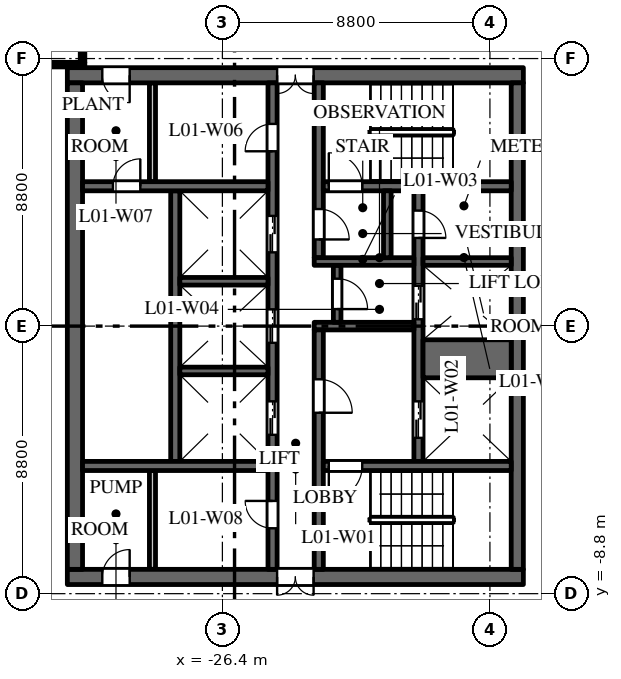
"""IFC4 building model, lengths in metres.
Left out: names, types, materials, properties, quantities, classifications, styles, units other than length and angle.
Written with IfcOpenShell. Run it as: python <this file> out.ifc"""

import sys

from ifc_helpers import new_model, si_unit, direction, frame, frame_2d, origin, place, context, subcontext, project, spatial, rectangle, extrude, element, fill, save


model = new_model("IFC4")
c1 = context("Model", 3, precision=1e-05, world=origin(), true_north=direction((0.0, 1.0)))
c2 = subcontext(c1, "Body", "Model", "MODEL_VIEW")
j1 = project(units=[si_unit("LENGTHUNIT", "METRE"), si_unit("PLANEANGLEUNIT", "RADIAN")], contexts=[c1])
p1 = place(None, origin())
s1 = spatial("IfcSite", under=j1, at=p1, CompositionType="ELEMENT")
p2 = place(p1, origin())
s2 = spatial("IfcBuilding", under=s1, at=p2, CompositionType="ELEMENT")
p3 = place(p2, frame((0.0, 0.0, 7.5)))
s3 = spatial("IfcBuildingStorey", under=s2, at=p3, CompositionType="ELEMENT", Elevation=7.5)
p4 = place(p3, frame((-16.5, 8.25, 0.0), z_axis=(0.0, 0.0, 1.0), x_axis=(-1.0, 0.0, 0.0)))
e1 = element("IfcWall", 1, at=p4, inside=s3, PredefinedType="SHEAR", context=c2, shape_type="SweptSolid", body=[
    extrude(rectangle(XDim=15.0, YDim=0.5, at=frame_2d((7.5, 0.0))), origin(), (0.0, 0.0, 1.0), 5.75),
])
p5 = place(p4, frame((6.9, 0.0, 0.0)))
e2 = element("IfcOpeningElement", 2, at=p5, cuts=e1, PredefinedType="OPENING", context=c2, shape_type="SweptSolid", body=[
    extrude(rectangle(XDim=1.2, YDim=2.1, at=frame_2d((0.6, 1.05))), frame((0.0, 0.26, 0.0), z_axis=(0.0, -1.0, 0.0), x_axis=(1.0, 0.0, 0.0)), (0.0, 0.0, 1.0), 0.52),
])
p6 = place(p4, frame((12.95, 0.0, 0.0)))
e3 = element("IfcOpeningElement", 3, at=p6, cuts=e1, PredefinedType="OPENING", context=c2, shape_type="SweptSolid", body=[
    extrude(rectangle(XDim=0.9, YDim=2.1, at=frame_2d((0.45, 1.05))), frame((0.0, 0.26, 0.0), z_axis=(0.0, -1.0, 0.0), x_axis=(1.0, 0.0, 0.0)), (0.0, 0.0, 1.0), 0.52),
])
p7 = place(p3, frame((-16.5, -8.25, 0.0), z_axis=(0.0, 0.0, 1.0), x_axis=(-1.0, 0.0, 0.0)))
e4 = element("IfcWall", 4, at=p7, inside=s3, PredefinedType="SHEAR", context=c2, shape_type="SweptSolid", body=[
    extrude(rectangle(XDim=15.0, YDim=0.5, at=frame_2d((7.5, 0.0))), origin(), (0.0, 0.0, 1.0), 5.75),
])
p8 = place(p7, frame((6.9, 0.0, 0.0)))
e5 = element("IfcOpeningElement", 5, at=p8, cuts=e4, PredefinedType="OPENING", context=c2, shape_type="SweptSolid", body=[
    extrude(rectangle(XDim=1.2, YDim=2.1, at=frame_2d((0.6, 1.05))), frame((0.0, 0.26, 0.0), z_axis=(0.0, -1.0, 0.0), x_axis=(1.0, 0.0, 0.0)), (0.0, 0.0, 1.0), 0.52),
])
p9 = place(p7, frame((12.95, 0.0, 0.0)))
e6 = element("IfcOpeningElement", 6, at=p9, cuts=e4, PredefinedType="OPENING", context=c2, shape_type="SweptSolid", body=[
    extrude(rectangle(XDim=0.9, YDim=2.1, at=frame_2d((0.45, 1.05))), frame((0.0, 0.26, 0.0), z_axis=(0.0, -1.0, 0.0), x_axis=(1.0, 0.0, 0.0)), (0.0, 0.0, 1.0), 0.52),
])
p10 = place(p3, frame((-27.95, -4.45, 0.0), z_axis=(0.0, 0.0, 1.0), x_axis=(0.0, 1.0, 0.0)))
e7 = element("IfcWall", 7, at=p10, inside=s3, PredefinedType="SHEAR", context=c2, shape_type="SweptSolid", body=[
    extrude(rectangle(XDim=8.9, YDim=0.3, at=frame_2d((4.45, 0.0))), origin(), (0.0, 0.0, 1.0), 5.75),
])
p11 = place(p3, frame((-19.95, -4.45, 0.0), z_axis=(0.0, 0.0, 1.0), x_axis=(0.0, 1.0, 0.0)))
e8 = element("IfcWall", 8, at=p11, inside=s3, PredefinedType="SHEAR", context=c2, shape_type="SweptSolid", body=[
    extrude(rectangle(XDim=8.9, YDim=0.3, at=frame_2d((4.45, 0.0))), origin(), (0.0, 0.0, 1.0), 5.75),
])
p12 = place(p11, frame((0.775, 0.0, 0.0)))
e9 = element("IfcOpeningElement", 9, at=p12, cuts=e8, PredefinedType="OPENING", context=c2, shape_type="SweptSolid", body=[
    extrude(rectangle(XDim=1.2, YDim=2.1, at=frame_2d((0.6, 1.05))), frame((0.0, 0.16, 0.0), z_axis=(0.0, -1.0, 0.0), x_axis=(1.0, 0.0, 0.0)), (0.0, 0.0, 1.0), 0.32),
])
p13 = place(p11, frame((4.675, 0.0, 0.0)))
e10 = element("IfcOpeningElement", 10, at=p13, cuts=e8, PredefinedType="OPENING", context=c2, shape_type="SweptSolid", body=[
    extrude(rectangle(XDim=1.1, YDim=2.1, at=frame_2d((0.55, 1.05))), frame((0.0, 0.16, 0.0), z_axis=(0.0, -1.0, 0.0), x_axis=(1.0, 0.0, 0.0)), (0.0, 0.0, 1.0), 0.32),
])
p14 = place(p11, frame((7.35, 0.0, 0.0)))
e11 = element("IfcOpeningElement", 11, at=p14, cuts=e8, PredefinedType="OPENING", context=c2, shape_type="SweptSolid", body=[
    extrude(rectangle(XDim=0.9, YDim=2.1, at=frame_2d((0.45, 1.05))), frame((0.0, 0.16, 0.0), z_axis=(0.0, -1.0, 0.0), x_axis=(1.0, 0.0, 0.0)), (0.0, 0.0, 1.0), 0.32),
])
p15 = place(p3, frame((-24.75, -8.0, 0.0), z_axis=(0.0, 0.0, 1.0), x_axis=(0.0, 1.0, 0.0)))
e12 = element("IfcWall", 12, at=p15, inside=s3, PredefinedType="SHEAR", context=c2, shape_type="SweptSolid", body=[
    extrude(rectangle(XDim=16.0, YDim=0.3, at=frame_2d((8.0, 0.0))), origin(), (0.0, 0.0, 1.0), 5.75),
])
p16 = place(p15, frame((4.425, 0.0, 0.0)))
e13 = element("IfcOpeningElement", 13, at=p16, cuts=e12, PredefinedType="OPENING", context=c2, shape_type="SweptSolid", body=[
    extrude(rectangle(XDim=1.1, YDim=2.1, at=frame_2d((0.55, 1.05))), frame((0.0, 0.16, 0.0), z_axis=(0.0, -1.0, 0.0), x_axis=(1.0, 0.0, 0.0)), (0.0, 0.0, 1.0), 0.32),
])
p17 = place(p15, frame((7.45, 0.0, 0.0)))
e14 = element("IfcOpeningElement", 14, at=p17, cuts=e12, PredefinedType="OPENING", context=c2, shape_type="SweptSolid", body=[
    extrude(rectangle(XDim=1.1, YDim=2.1, at=frame_2d((0.55, 1.05))), frame((0.0, 0.16, 0.0), z_axis=(0.0, -1.0, 0.0), x_axis=(1.0, 0.0, 0.0)), (0.0, 0.0, 1.0), 0.32),
])
p18 = place(p15, frame((10.425, 0.0, 0.0)))
e15 = element("IfcOpeningElement", 15, at=p18, cuts=e12, PredefinedType="OPENING", context=c2, shape_type="SweptSolid", body=[
    extrude(rectangle(XDim=1.2, YDim=2.1, at=frame_2d((0.6, 1.05))), frame((0.0, 0.16, 0.0), z_axis=(0.0, -1.0, 0.0), x_axis=(1.0, 0.0, 0.0)), (0.0, 0.0, 1.0), 0.32),
])
p19 = place(p15, frame((13.75, 0.0, 0.0)))
e16 = element("IfcOpeningElement", 16, at=p19, cuts=e12, PredefinedType="OPENING", context=c2, shape_type="SweptSolid", body=[
    extrude(rectangle(XDim=0.9, YDim=2.1, at=frame_2d((0.45, 1.05))), frame((0.0, 0.16, 0.0), z_axis=(0.0, -1.0, 0.0), x_axis=(1.0, 0.0, 0.0)), (0.0, 0.0, 1.0), 0.32),
])
p20 = place(p15, frame((1.35, 0.0, 0.0)))
e17 = element("IfcOpeningElement", 17, at=p20, cuts=e12, PredefinedType="OPENING", context=c2, shape_type="SweptSolid", body=[
    extrude(rectangle(XDim=0.9, YDim=2.1, at=frame_2d((0.45, 1.05))), frame((0.0, 0.16, 0.0), z_axis=(0.0, -1.0, 0.0), x_axis=(1.0, 0.0, 0.0)), (0.0, 0.0, 1.0), 0.32),
])
p21 = place(p3, frame((-20.1, 0.0, 0.0), z_axis=(0.0, 0.0, 1.0), x_axis=(-1.0, 0.0, 0.0)))
e18 = element("IfcWall", 18, at=p21, inside=s3, PredefinedType="SHEAR", context=c2, shape_type="SweptSolid", body=[
    extrude(rectangle(XDim=3.28, YDim=0.25, at=frame_2d((1.64, 0.0))), origin(), (0.0, 0.0, 1.0), 5.75),
])
p22 = place(p3, frame((-16.7, -8.0, 0.0), z_axis=(0.0, 0.0, 1.0), x_axis=(0.0, 1.0, 0.0)))
e19 = element("IfcWall", 19, at=p22, inside=s3, PredefinedType="SHEAR", context=c2, shape_type="SweptSolid", body=[
    extrude(rectangle(XDim=16.0, YDim=0.4, at=frame_2d((8.0, 0.0))), origin(), (0.0, 0.0, 1.0), 5.75),
])
p23 = place(p3, frame((-22.625, 0.125, 0.0), z_axis=(0.0, 0.0, 1.0), x_axis=(0.0, 1.0, 0.0)))
e20 = element("IfcWall", 20, at=p23, inside=s3, PredefinedType="SHEAR", context=c2, shape_type="SweptSolid", body=[
    extrude(rectangle(XDim=1.875, YDim=0.25, at=frame_2d((0.938, 0.0))), origin(), (0.0, 0.0, 1.0), 5.75),
])
p24 = place(p23, frame((0.435, 0.0, 0.0)))
e21 = element("IfcOpeningElement", 21, at=p24, cuts=e20, PredefinedType="OPENING", context=c2, shape_type="SweptSolid", body=[
    extrude(rectangle(XDim=1.0, YDim=2.1, at=frame_2d((0.5, 1.05))), frame((0.0, 0.135, 0.0), z_axis=(0.0, -1.0, 0.0), x_axis=(1.0, 0.0, 0.0)), (0.0, 0.0, 1.0), 0.27),
])
p25 = place(p3, frame((-31.25, -8.0, 0.0), z_axis=(0.0, 0.0, 1.0), x_axis=(0.0, 1.0, 0.0)))
e22 = element("IfcWall", 22, at=p25, inside=s3, PredefinedType="SHEAR", context=c2, shape_type="SweptSolid", body=[
    extrude(rectangle(XDim=16.0, YDim=0.5, at=frame_2d((8.0, 0.0))), origin(), (0.0, 0.0, 1.0), 5.75),
])
p26 = place(p3, frame((-24.9, 4.6, 0.0), z_axis=(0.0, 0.0, 1.0), x_axis=(-1.0, 0.0, 0.0)))
e23 = element("IfcWall", 23, at=p26, inside=s3, PredefinedType="SHEAR", context=c2, shape_type="SweptSolid", body=[
    extrude(rectangle(XDim=6.1, YDim=0.3, at=frame_2d((3.05, 0.0))), origin(), (0.0, 0.0, 1.0), 5.75),
])
p27 = place(p26, frame((4.2, 0.0, 0.0)))
e24 = element("IfcOpeningElement", 24, at=p27, cuts=e23, PredefinedType="OPENING", context=c2, shape_type="SweptSolid", body=[
    extrude(rectangle(XDim=0.9, YDim=2.1, at=frame_2d((0.45, 1.05))), frame((0.0, 0.16, 0.0), z_axis=(0.0, -1.0, 0.0), x_axis=(1.0, 0.0, 0.0)), (0.0, 0.0, 1.0), 0.32),
])
for number, where, z_axis, x_axis in (
    (25, (-28.7, 4.75, 0.0), (0.0, 0.0, 1.0), (0.0, 1.0, 0.0)),
    (26, (-28.7, -8.0, 0.0), (0.0, 0.0, 1.0), (0.0, 1.0, 0.0)),
):
    element("IfcWall", number, at=place(p3, frame(where, z_axis=z_axis, x_axis=x_axis)), inside=s3, PredefinedType="PARTITIONING", context=c2, shape_type="SweptSolid", body=[
        extrude(rectangle(XDim=3.25, YDim=0.2, at=frame_2d((1.625, 0.0))), origin(), (0.0, 0.0, 1.0), 5.75),
    ])
p28 = place(p3, frame((-24.9, -4.6, 0.0), z_axis=(0.0, 0.0, 1.0), x_axis=(-1.0, 0.0, 0.0)))
e27 = element("IfcWall", 27, at=p28, inside=s3, PredefinedType="SHEAR", context=c2, shape_type="SweptSolid", body=[
    extrude(rectangle(XDim=6.1, YDim=0.3, at=frame_2d((3.05, 0.0))), origin(), (0.0, 0.0, 1.0), 5.75),
])
p29 = place(p3, frame((-16.9, -1.075, 0.0), z_axis=(0.0, 0.0, 1.0), x_axis=(-1.0, 0.0, 0.0)))
e28 = element("IfcWall", 28, at=p29, inside=s3, PredefinedType="SHEAR", context=c2, shape_type="SweptSolid", body=[
    extrude(rectangle(XDim=2.9, YDim=1.25, at=frame_2d((1.45, 0.0))), origin(), (0.0, 0.0, 1.0), 5.75),
])
for number, where, z_axis, x_axis in (
    (29, (-16.9, 2.125, 0.0), (0.0, 0.0, 1.0), (-1.0, 0.0, 0.0)),
    (30, (-24.9, -1.475, 0.0), (0.0, 0.0, 1.0), (-1.0, 0.0, 0.0)),
    (31, (-24.9, 1.475, 0.0), (0.0, 0.0, 1.0), (-1.0, 0.0, 0.0)),
):
    element("IfcWall", number, at=place(p3, frame(where, z_axis=z_axis, x_axis=x_axis)), inside=s3, PredefinedType="SHEAR", context=c2, shape_type="SweptSolid", body=[
        extrude(rectangle(XDim=2.9, YDim=0.25, at=frame_2d((1.45, 0.0))), origin(), (0.0, 0.0, 1.0), 5.75),
    ])
p30 = place(p3, frame((-23.23, 2.25, 0.0), z_axis=(0.0, 0.0, 1.0), x_axis=(0.0, 1.0, 0.0)))
e32 = element("IfcWall", 32, at=p30, inside=s3, PredefinedType="SHEAR", context=c2, shape_type="SweptSolid", body=[
    extrude(rectangle(XDim=5.75, YDim=0.3, at=frame_2d((2.875, 0.0))), origin(), (0.0, 0.0, 1.0), 5.75),
])
p31 = place(p30, frame((0.6, 0.0, 0.0)))
e33 = element("IfcOpeningElement", 33, at=p31, cuts=e32, PredefinedType="OPENING", context=c2, shape_type="SweptSolid", body=[
    extrude(rectangle(XDim=1.0, YDim=2.1, at=frame_2d((0.5, 1.05))), frame((0.0, 0.16, 0.0), z_axis=(0.0, -1.0, 0.0), x_axis=(1.0, 0.0, 0.0)), (0.0, 0.0, 1.0), 0.32),
])
p32 = place(p3, frame((-23.23, -8.0, 0.0), z_axis=(0.0, 0.0, 1.0), x_axis=(0.0, 1.0, 0.0)))
e34 = element("IfcWall", 34, at=p32, inside=s3, PredefinedType="SHEAR", context=c2, shape_type="SweptSolid", body=[
    extrude(rectangle(XDim=7.875, YDim=0.3, at=frame_2d((3.938, 0.0))), origin(), (0.0, 0.0, 1.0), 5.75),
])
p33 = place(p32, frame((5.15, 0.0, 0.0)))
e35 = element("IfcOpeningElement", 35, at=p33, cuts=e34, PredefinedType="OPENING", context=c2, shape_type="SweptSolid", body=[
    extrude(rectangle(XDim=1.1, YDim=2.1, at=frame_2d((0.55, 1.05))), frame((0.0, 0.16, 0.0), z_axis=(0.0, -1.0, 0.0), x_axis=(1.0, 0.0, 0.0)), (0.0, 0.0, 1.0), 0.32),
])
p34 = place(p3, frame((-16.9, 4.6, 0.0), z_axis=(0.0, 0.0, 1.0), x_axis=(-1.0, 0.0, 0.0)))
e36 = element("IfcWall", 36, at=p34, inside=s3, PredefinedType="SHEAR", context=c2, shape_type="SweptSolid", body=[
    extrude(rectangle(XDim=6.18, YDim=0.3, at=frame_2d((3.09, 0.0))), origin(), (0.0, 0.0, 1.0), 5.75),
])
p35 = place(p34, frame((4.9, 0.0, 0.0)))
e37 = element("IfcOpeningElement", 37, at=p35, cuts=e36, PredefinedType="OPENING", context=c2, shape_type="SweptSolid", body=[
    extrude(rectangle(XDim=1.1, YDim=2.1, at=frame_2d((0.55, 1.05))), frame((0.0, 0.16, 0.0), z_axis=(0.0, -1.0, 0.0), x_axis=(1.0, 0.0, 0.0)), (0.0, 0.0, 1.0), 0.32),
])
p36 = place(p3, frame((-16.9, -4.6, 0.0), z_axis=(0.0, 0.0, 1.0), x_axis=(-1.0, 0.0, 0.0)))
e38 = element("IfcWall", 38, at=p36, inside=s3, PredefinedType="SHEAR", context=c2, shape_type="SweptSolid", body=[
    extrude(rectangle(XDim=6.18, YDim=0.3, at=frame_2d((3.09, 0.0))), origin(), (0.0, 0.0, 1.0), 5.75),
])
p37 = place(p36, frame((4.9, 0.0, 0.0)))
e39 = element("IfcOpeningElement", 39, at=p37, cuts=e38, PredefinedType="OPENING", context=c2, shape_type="SweptSolid", body=[
    extrude(rectangle(XDim=1.1, YDim=2.1, at=frame_2d((0.55, 1.05))), frame((0.0, 0.16, 0.0), z_axis=(0.0, -1.0, 0.0), x_axis=(1.0, 0.0, 0.0)), (0.0, 0.0, 1.0), 0.32),
])
p38 = place(p3, frame((-20.1, 2.125, 0.0), z_axis=(0.0, 0.0, 1.0), x_axis=(-1.0, 0.0, 0.0)))
e40 = element("IfcWall", 40, at=p38, inside=s3, PredefinedType="SHEAR", context=c2, shape_type="SweptSolid", body=[
    extrude(rectangle(XDim=3.28, YDim=0.25, at=frame_2d((1.64, 0.0))), origin(), (0.0, 0.0, 1.0), 5.75),
])
p39 = place(p3, frame((-20.975, 2.25, 0.0), z_axis=(0.0, 0.0, 1.0), x_axis=(0.0, 1.0, 0.0)))
e41 = element("IfcWall", 41, at=p39, inside=s3, PredefinedType="SHEAR", context=c2, shape_type="SweptSolid", body=[
    extrude(rectangle(XDim=2.2, YDim=0.25, at=frame_2d((1.1, 0.0))), origin(), (0.0, 0.0, 1.0), 5.75),
])
p40 = place(p3, frame((-30.925, 8.6, 0.0), z_axis=(0.0, 0.0, 1.0), x_axis=(-1.0, 0.0, 0.0)))
e42 = element("IfcWall", 42, at=p40, inside=s3, PredefinedType="PARTITIONING", context=c2, shape_type="SweptSolid", body=[
    extrude(rectangle(XDim=8.025, YDim=0.15, at=frame_2d((4.012, 0.0))), origin(), (0.0, 0.0, 1.0), 4.85),
])
p41 = place(p40, frame((4.012, 0.0, 0.0)))
e43 = element("IfcOpeningElement", 43, at=p41, cuts=e42, PredefinedType="OPENING", context=c2, shape_type="SweptSolid", body=[
    extrude(rectangle(XDim=1.0, YDim=2.1, at=frame_2d((0.5, 1.05))), frame((0.0, 0.085, 0.0), z_axis=(0.0, -1.0, 0.0), x_axis=(1.0, 0.0, 0.0)), (0.0, 0.0, 1.0), 0.17),
])
p42 = place(p3, frame((-31.0, 11.925, 0.0), z_axis=(0.0, 0.0, 1.0), x_axis=(0.0, -1.0, 0.0)))
e44 = element("IfcWall", 44, at=p42, inside=s3, PredefinedType="PARTITIONING", context=c2, shape_type="SweptSolid", body=[
    extrude(rectangle(XDim=3.25, YDim=0.15, at=frame_2d((1.625, 0.0))), origin(), (0.0, 0.0, 1.0), 5.75),
])
p43 = place(p12, origin())
e45 = element("IfcDoor", 45, at=p43, inside=s3, OperationType="DOUBLE_DOOR_SLIDING", PredefinedType="DOOR", context=c2, shape_type="SweptSolid", body=[
    extrude(rectangle(XDim=1.2, YDim=2.1, at=frame_2d((0.6, 1.05))), frame((0.0, 0.025, 0.0), z_axis=(0.0, -1.0, 0.0), x_axis=(1.0, 0.0, 0.0)), (0.0, 0.0, 1.0), 0.05),
])
fill(e9, e45)
p44 = place(p13, origin())
e46 = element("IfcDoor", 46, at=p44, inside=s3, OperationType="DOUBLE_DOOR_SLIDING", PredefinedType="DOOR", context=c2, shape_type="SweptSolid", body=[
    extrude(rectangle(XDim=1.1, YDim=2.1, at=frame_2d((0.55, 1.05))), frame((0.0, 0.025, 0.0), z_axis=(0.0, -1.0, 0.0), x_axis=(1.0, 0.0, 0.0)), (0.0, 0.0, 1.0), 0.05),
])
fill(e10, e46)
p45 = place(p16, origin())
e47 = element("IfcDoor", 47, at=p45, inside=s3, OperationType="DOUBLE_DOOR_SLIDING", PredefinedType="DOOR", context=c2, shape_type="SweptSolid", body=[
    extrude(rectangle(XDim=1.1, YDim=2.1, at=frame_2d((0.55, 1.05))), frame((0.0, 0.025, 0.0), z_axis=(0.0, -1.0, 0.0), x_axis=(1.0, 0.0, 0.0)), (0.0, 0.0, 1.0), 0.05),
])
fill(e13, e47)
p46 = place(p17, origin())
e48 = element("IfcDoor", 48, at=p46, inside=s3, OperationType="DOUBLE_DOOR_SLIDING", PredefinedType="DOOR", context=c2, shape_type="SweptSolid", body=[
    extrude(rectangle(XDim=1.1, YDim=2.1, at=frame_2d((0.55, 1.05))), frame((0.0, 0.025, 0.0), z_axis=(0.0, -1.0, 0.0), x_axis=(1.0, 0.0, 0.0)), (0.0, 0.0, 1.0), 0.05),
])
fill(e14, e48)
p47 = place(p18, origin())
e49 = element("IfcDoor", 49, at=p47, inside=s3, OperationType="DOUBLE_DOOR_SLIDING", PredefinedType="DOOR", context=c2, shape_type="SweptSolid", body=[
    extrude(rectangle(XDim=1.2, YDim=2.1, at=frame_2d((0.6, 1.05))), frame((0.0, 0.025, 0.0), z_axis=(0.0, -1.0, 0.0), x_axis=(1.0, 0.0, 0.0)), (0.0, 0.0, 1.0), 0.05),
])
fill(e15, e49)
p48 = place(p35, origin())
e50 = element("IfcDoor", 50, at=p48, inside=s3, OperationType="SINGLE_SWING_RIGHT", PredefinedType="DOOR", context=c2, shape_type="SweptSolid", body=[
    extrude(rectangle(XDim=1.1, YDim=2.1, at=frame_2d((0.55, 1.05))), frame((0.0, 0.025, 0.0), z_axis=(0.0, -1.0, 0.0), x_axis=(1.0, 0.0, 0.0)), (0.0, 0.0, 1.0), 0.05),
])
fill(e37, e50)
p49 = place(p37, origin())
e51 = element("IfcDoor", 51, at=p49, inside=s3, OperationType="SINGLE_SWING_LEFT", PredefinedType="DOOR", context=c2, shape_type="SweptSolid", body=[
    extrude(rectangle(XDim=1.1, YDim=2.1, at=frame_2d((0.55, 1.05))), frame((0.0, 0.025, 0.0), z_axis=(0.0, -1.0, 0.0), x_axis=(1.0, 0.0, 0.0)), (0.0, 0.0, 1.0), 0.05),
])
fill(e39, e51)
p50 = place(p33, origin())
e52 = element("IfcDoor", 52, at=p50, inside=s3, OperationType="SINGLE_SWING_LEFT", PredefinedType="DOOR", context=c2, shape_type="SweptSolid", body=[
    extrude(rectangle(XDim=1.1, YDim=2.1, at=frame_2d((0.55, 1.05))), frame((0.0, 0.025, 0.0), z_axis=(0.0, -1.0, 0.0), x_axis=(1.0, 0.0, 0.0)), (0.0, 0.0, 1.0), 0.05),
])
fill(e35, e52)
p51 = place(p31, origin())
e53 = element("IfcDoor", 53, at=p51, inside=s3, OperationType="SINGLE_SWING_LEFT", PredefinedType="DOOR", context=c2, shape_type="SweptSolid", body=[
    extrude(rectangle(XDim=1.0, YDim=2.1, at=frame_2d((0.5, 1.05))), frame((0.0, 0.025, 0.0), z_axis=(0.0, -1.0, 0.0), x_axis=(1.0, 0.0, 0.0)), (0.0, 0.0, 1.0), 0.05),
])
fill(e33, e53)
p52 = place(p24, origin())
e54 = element("IfcDoor", 54, at=p52, inside=s3, OperationType="SINGLE_SWING_LEFT", PredefinedType="DOOR", context=c2, shape_type="SweptSolid", body=[
    extrude(rectangle(XDim=1.0, YDim=2.1, at=frame_2d((0.5, 1.05))), frame((0.0, 0.025, 0.0), z_axis=(0.0, -1.0, 0.0), x_axis=(1.0, 0.0, 0.0)), (0.0, 0.0, 1.0), 0.05),
])
fill(e21, e54)
p53 = place(p5, origin())
e55 = element("IfcDoor", 55, at=p53, inside=s3, OperationType="DOUBLE_DOOR_DOUBLE_SWING", PredefinedType="DOOR", context=c2, shape_type="SweptSolid", body=[
    extrude(rectangle(XDim=1.2, YDim=2.1, at=frame_2d((0.6, 1.05))), frame((0.0, 0.025, 0.0), z_axis=(0.0, -1.0, 0.0), x_axis=(1.0, 0.0, 0.0)), (0.0, 0.0, 1.0), 0.05),
])
fill(e2, e55)
p54 = place(p8, origin())
e56 = element("IfcDoor", 56, at=p54, inside=s3, OperationType="DOUBLE_DOOR_DOUBLE_SWING", PredefinedType="DOOR", context=c2, shape_type="SweptSolid", body=[
    extrude(rectangle(XDim=1.2, YDim=2.1, at=frame_2d((0.6, 1.05))), frame((0.0, 0.025, 0.0), z_axis=(0.0, -1.0, 0.0), x_axis=(1.0, 0.0, 0.0)), (0.0, 0.0, 1.0), 0.05),
])
fill(e5, e56)
p55 = place(p14, origin())
e57 = element("IfcDoor", 57, at=p55, inside=s3, OperationType="SINGLE_SWING_LEFT", PredefinedType="DOOR", context=c2, shape_type="SweptSolid", body=[
    extrude(rectangle(XDim=0.9, YDim=2.1, at=frame_2d((0.45, 1.05))), frame((0.0, 0.025, 0.0), z_axis=(0.0, -1.0, 0.0), x_axis=(1.0, 0.0, 0.0)), (0.0, 0.0, 1.0), 0.05),
])
fill(e11, e57)
p56 = place(p19, origin())
e58 = element("IfcDoor", 58, at=p56, inside=s3, OperationType="SINGLE_SWING_RIGHT", PredefinedType="DOOR", context=c2, shape_type="SweptSolid", body=[
    extrude(rectangle(XDim=0.9, YDim=2.1, at=frame_2d((0.45, 1.05))), frame((0.0, 0.025, 0.0), z_axis=(0.0, -1.0, 0.0), x_axis=(1.0, 0.0, 0.0)), (0.0, 0.0, 1.0), 0.05),
])
fill(e16, e58)
p57 = place(p6, origin())
e59 = element("IfcDoor", 59, at=p57, inside=s3, OperationType="SINGLE_SWING_RIGHT", PredefinedType="DOOR", context=c2, shape_type="SweptSolid", body=[
    extrude(rectangle(XDim=0.9, YDim=2.1, at=frame_2d((0.45, 1.05))), frame((0.0, 0.025, 0.0), z_axis=(0.0, -1.0, 0.0), x_axis=(1.0, 0.0, 0.0)), (0.0, 0.0, 1.0), 0.05),
])
fill(e3, e59)
p58 = place(p20, origin())
e60 = element("IfcDoor", 60, at=p58, inside=s3, OperationType="SINGLE_SWING_LEFT", PredefinedType="DOOR", context=c2, shape_type="SweptSolid", body=[
    extrude(rectangle(XDim=0.9, YDim=2.1, at=frame_2d((0.45, 1.05))), frame((0.0, 0.025, 0.0), z_axis=(0.0, -1.0, 0.0), x_axis=(1.0, 0.0, 0.0)), (0.0, 0.0, 1.0), 0.05),
])
fill(e17, e60)
p59 = place(p9, origin())
e61 = element("IfcDoor", 61, at=p59, inside=s3, OperationType="SINGLE_SWING_LEFT", PredefinedType="DOOR", context=c2, shape_type="SweptSolid", body=[
    extrude(rectangle(XDim=0.9, YDim=2.1, at=frame_2d((0.45, 1.05))), frame((0.0, 0.025, 0.0), z_axis=(0.0, -1.0, 0.0), x_axis=(1.0, 0.0, 0.0)), (0.0, 0.0, 1.0), 0.05),
])
fill(e6, e61)
p60 = place(p27, origin())
e62 = element("IfcDoor", 62, at=p60, inside=s3, OperationType="SINGLE_SWING_LEFT", PredefinedType="DOOR", context=c2, shape_type="SweptSolid", body=[
    extrude(rectangle(XDim=0.9, YDim=2.1, at=frame_2d((0.45, 1.05))), frame((0.0, 0.025, 0.0), z_axis=(0.0, -1.0, 0.0), x_axis=(1.0, 0.0, 0.0)), (0.0, 0.0, 1.0), 0.05),
])
fill(e24, e62)
save(model, sys.argv[1])
